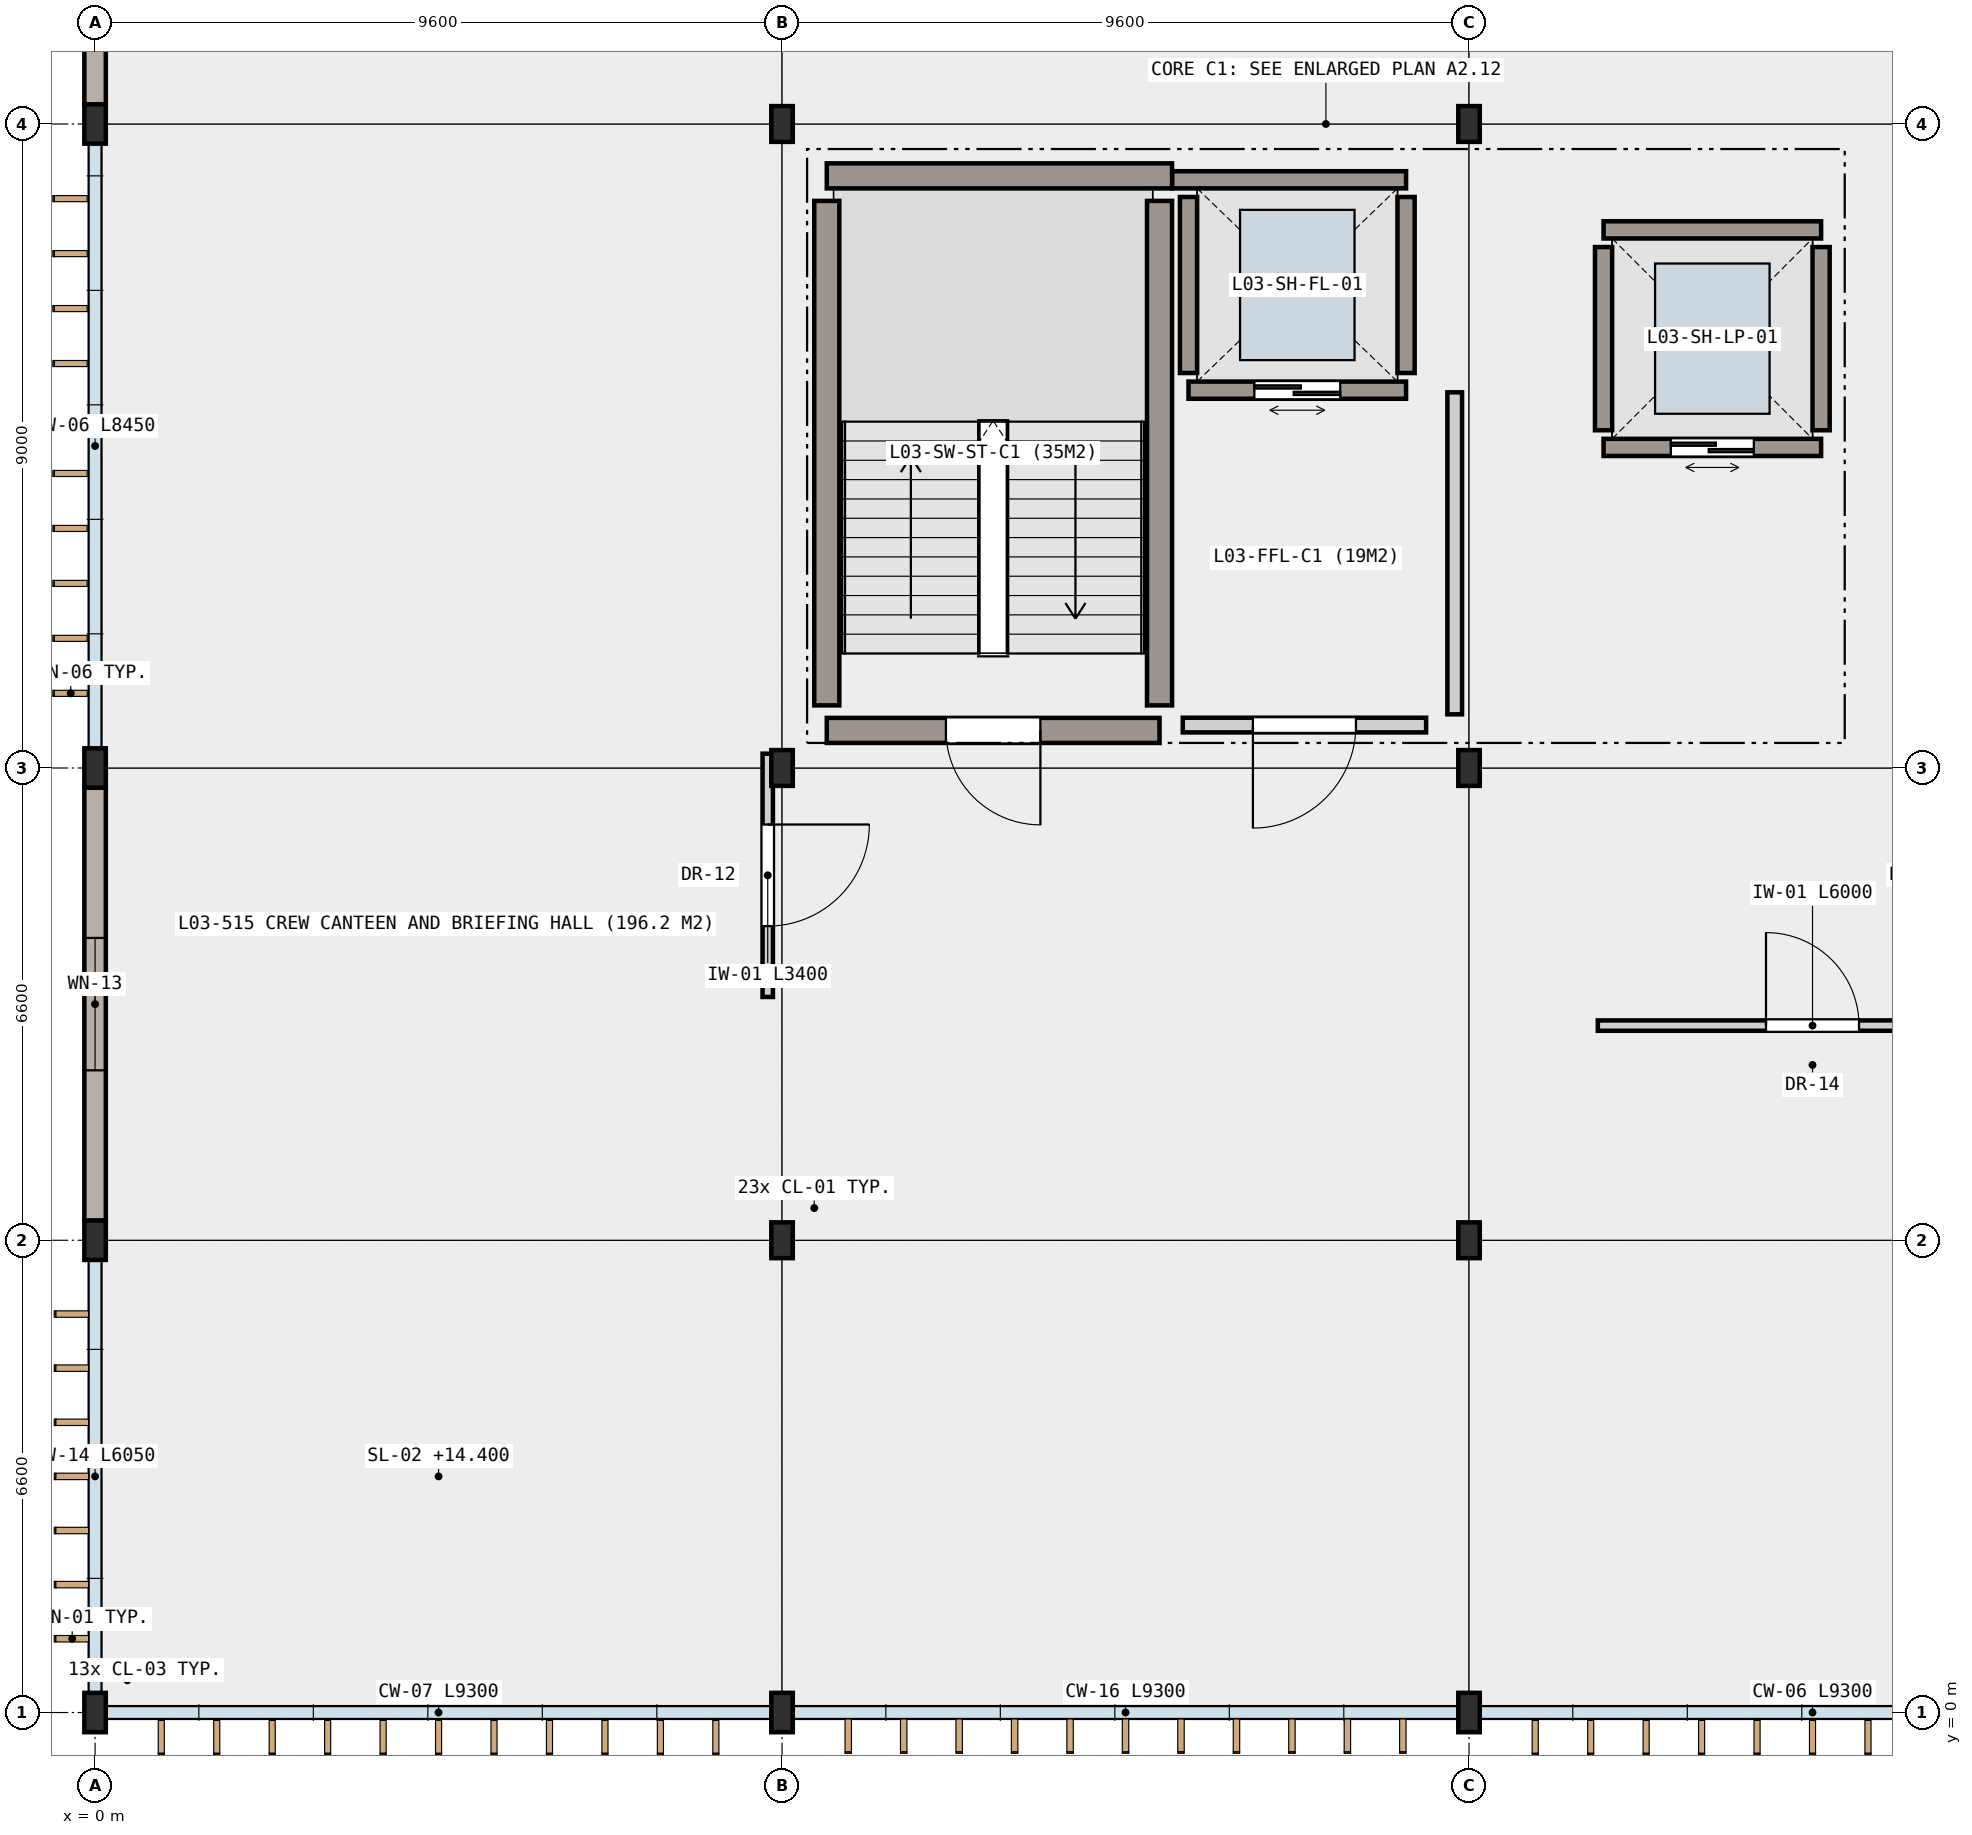
"""IFC4 building model, lengths in metres.
Left out: names, types, materials, properties, quantities, classifications, styles, units other than length and angle.
Written with IfcOpenShell. Run it as: python <this file> out.ifc"""

import sys

from ifc_helpers import new_model, si_unit, direction, frame, frame_2d, origin, origin_2d, place, context, subcontext, project, spatial, rectangle, i_section, extrude, element, fill, save


model = new_model("IFC4")
c1 = context("Model", 3, precision=1e-05, world=origin(), true_north=direction((0.0, 1.0)))
c2 = subcontext(c1, "Body", "Model", "MODEL_VIEW")
j1 = project(units=[si_unit("LENGTHUNIT", "METRE"), si_unit("PLANEANGLEUNIT", "RADIAN")], contexts=[c1])
p1 = place(None, origin())
s1 = spatial("IfcSite", under=j1, at=p1, CompositionType="ELEMENT")
p2 = place(p1, origin())
s2 = spatial("IfcBuilding", under=s1, at=p2, CompositionType="ELEMENT")
p3 = place(p2, frame((0.0, 0.0, 14.4)))
s3 = spatial("IfcBuildingStorey", under=s2, at=p3, CompositionType="ELEMENT", Elevation=14.4)
for number, where, z_axis, x_axis in (
    (1, (0.0, 0.0, 0.0), (0.0, 0.0, 1.0), (1.0, 0.0, 0.0)),
    (2, (0.0, 6.6, 0.0), (0.0, 0.0, 1.0), (1.0, 0.0, 0.0)),
    (3, (0.0, 13.2, 0.0), (0.0, 0.0, 1.0), (1.0, 0.0, 0.0)),
    (4, (0.0, 22.2, 0.0), (0.0, 0.0, 1.0), (1.0, 0.0, 0.0)),
    (5, (9.6, 0.0, 0.0), (0.0, 0.0, 1.0), (1.0, 0.0, 0.0)),
):
    element("IfcColumn", number, at=place(p3, frame(where, z_axis=z_axis, x_axis=x_axis)), inside=s3, PredefinedType="COLUMN", context=c2, shape_type="SweptSolid", body=[
        extrude(i_section(OverallWidth=0.3, OverallDepth=0.55, WebThickness=0.015, FlangeThickness=0.029, FilletRadius=0.027, at=origin_2d()), origin(), (0.0, 0.0, 1.0), 4.2),
    ])
for number, where, z_axis, x_axis in (
    (6, (9.6, 6.6, 0.0), (0.0, 0.0, 1.0), (1.0, 0.0, 0.0)),
    (7, (9.6, 13.2, 0.0), (0.0, 0.0, 1.0), (1.0, 0.0, 0.0)),
    (8, (9.6, 22.2, 0.0), (0.0, 0.0, 1.0), (1.0, 0.0, 0.0)),
):
    element("IfcColumn", number, at=place(p3, frame(where, z_axis=z_axis, x_axis=x_axis)), inside=s3, PredefinedType="COLUMN", context=c2, shape_type="SweptSolid", body=[
        extrude(i_section(OverallWidth=0.3, OverallDepth=0.5, WebThickness=0.014, FlangeThickness=0.028, FilletRadius=0.027, at=origin_2d()), origin(), (0.0, 0.0, 1.0), 4.2),
    ])
p4 = place(p3, frame((19.2, 0.0, 0.0), z_axis=(0.0, 0.0, 1.0), x_axis=(1.0, 0.0, 0.0)))
e9 = element("IfcColumn", 9, at=p4, inside=s3, PredefinedType="COLUMN", context=c2, shape_type="SweptSolid", body=[
    extrude(i_section(OverallWidth=0.3, OverallDepth=0.55, WebThickness=0.015, FlangeThickness=0.029, FilletRadius=0.027, at=origin_2d()), origin(), (0.0, 0.0, 1.0), 4.2),
])
for number, where, z_axis, x_axis in (
    (10, (19.2, 6.6, 0.0), (0.0, 0.0, 1.0), (1.0, 0.0, 0.0)),
    (11, (19.2, 13.2, 0.0), (0.0, 0.0, 1.0), (1.0, 0.0, 0.0)),
    (12, (19.2, 22.2, 0.0), (0.0, 0.0, 1.0), (1.0, 0.0, 0.0)),
):
    element("IfcColumn", number, at=place(p3, frame(where, z_axis=z_axis, x_axis=x_axis)), inside=s3, PredefinedType="COLUMN", context=c2, shape_type="SweptSolid", body=[
        extrude(i_section(OverallWidth=0.3, OverallDepth=0.5, WebThickness=0.014, FlangeThickness=0.028, FilletRadius=0.027, at=origin_2d()), origin(), (0.0, 0.0, 1.0), 4.2),
    ])
p5 = place(p3, frame((0.0, 6.875, 0.0), z_axis=(0.0, 0.0, 1.0), x_axis=(0.0, 1.0, 0.0)))
e13 = element("IfcWall", 13, at=p5, inside=s3, PredefinedType="SOLIDWALL", context=c2, shape_type="SweptSolid", body=[
    extrude(rectangle(XDim=6.05, YDim=0.3, at=frame_2d((3.025, 0.0))), origin(), (0.0, 0.0, 1.0), 3.53),
])
p6 = place(p5, frame((2.1, 0.0, 0.85)))
e14 = element("IfcOpeningElement", 14, at=p6, cuts=e13, PredefinedType="OPENING", context=c2, shape_type="SweptSolid", body=[
    extrude(rectangle(XDim=1.85, YDim=1.5, at=frame_2d((0.925, 0.75))), frame((0.0, 0.16, 0.0), z_axis=(0.0, -1.0, 0.0), x_axis=(1.0, 0.0, 0.0)), (0.0, 0.0, 1.0), 0.32),
])
p7 = place(p3, frame((0.0, 22.475, 0.0), z_axis=(0.0, 0.0, 1.0), x_axis=(0.0, 1.0, 0.0)))
e15 = element("IfcWall", 15, at=p7, inside=s3, PredefinedType="SOLIDWALL", context=c2, shape_type="SweptSolid", body=[
    extrude(rectangle(XDim=8.45, YDim=0.3, at=frame_2d((4.225, 0.0))), origin(), (0.0, 0.0, 1.0), 3.53),
])
p8 = place(p7, frame((1.188, 0.0, 0.85)))
e16 = element("IfcOpeningElement", 16, at=p8, cuts=e15, PredefinedType="OPENING", context=c2, shape_type="SweptSolid", body=[
    extrude(rectangle(XDim=1.85, YDim=1.85, at=frame_2d((0.925, 0.925))), frame((0.0, 0.16, 0.0), z_axis=(0.0, -1.0, 0.0), x_axis=(1.0, 0.0, 0.0)), (0.0, 0.0, 1.0), 0.32),
])
p9 = place(p7, frame((5.413, 0.0, 0.85)))
e17 = element("IfcOpeningElement", 17, at=p9, cuts=e15, PredefinedType="OPENING", context=c2, shape_type="SweptSolid", body=[
    extrude(rectangle(XDim=1.85, YDim=2.15, at=frame_2d((0.925, 1.075))), frame((0.0, 0.16, 0.0), z_axis=(0.0, -1.0, 0.0), x_axis=(1.0, 0.0, 0.0)), (0.0, 0.0, 1.0), 0.32),
])
p10 = place(p3, frame((18.32, 18.48, 0.0), z_axis=(0.0, 0.0, 1.0), x_axis=(-1.0, 0.0, 0.0)))
e18 = element("IfcWall", 18, at=p10, inside=s3, PredefinedType="SHEAR", context=c2, shape_type="SweptSolid", body=[
    extrude(rectangle(XDim=3.04, YDim=0.24, at=frame_2d((1.52, 0.0))), origin(), (0.0, 0.0, 1.0), 3.96),
])
p11 = place(p10, frame((0.92, 0.0, 0.0)))
e19 = element("IfcOpeningElement", 19, at=p11, cuts=e18, PredefinedType="OPENING", context=c2, shape_type="SweptSolid", body=[
    extrude(rectangle(XDim=1.2, YDim=2.15, at=frame_2d((0.6, 1.075))), frame((0.0, 0.13, 0.0), z_axis=(0.0, -1.0, 0.0), x_axis=(1.0, 0.0, 0.0)), (0.0, 0.0, 1.0), 0.26),
])
p12 = place(p3, frame((15.05, 21.42, 0.0), z_axis=(0.0, 0.0, 1.0), x_axis=(1.0, 0.0, 0.0)))
e20 = element("IfcWall", 20, at=p12, inside=s3, PredefinedType="SHEAR", context=c2, shape_type="SweptSolid", body=[
    extrude(rectangle(XDim=3.27, YDim=0.24, at=frame_2d((1.635, 0.0))), origin(), (0.0, 0.0, 1.0), 3.96),
])
for number, where, z_axis, x_axis in (
    (21, (15.28, 18.72, 0.0), (0.0, 0.0, 1.0), (0.0, 1.0, 0.0)),
    (22, (18.32, 21.18, 0.0), (0.0, 0.0, 1.0), (0.0, -1.0, 0.0)),
):
    element("IfcWall", number, at=place(p3, frame(where, z_axis=z_axis, x_axis=x_axis)), inside=s3, PredefinedType="SHEAR", context=c2, shape_type="SweptSolid", body=[
        extrude(rectangle(XDim=2.46, YDim=0.24, at=frame_2d((1.23, 0.0))), origin(), (0.0, 0.0, 1.0), 3.96),
    ])
p13 = place(p3, frame((24.12, 17.68, 0.0), z_axis=(0.0, 0.0, 1.0), x_axis=(-1.0, 0.0, 0.0)))
e23 = element("IfcWall", 23, at=p13, inside=s3, PredefinedType="SHEAR", context=c2, shape_type="SweptSolid", body=[
    extrude(rectangle(XDim=3.04, YDim=0.24, at=frame_2d((1.52, 0.0))), origin(), (0.0, 0.0, 1.0), 3.96),
])
p14 = place(p13, frame((0.94, 0.0, 0.0)))
e24 = element("IfcOpeningElement", 24, at=p14, cuts=e23, PredefinedType="OPENING", context=c2, shape_type="SweptSolid", body=[
    extrude(rectangle(XDim=1.16, YDim=2.15, at=frame_2d((0.58, 1.075))), frame((0.0, 0.13, 0.0), z_axis=(0.0, -1.0, 0.0), x_axis=(1.0, 0.0, 0.0)), (0.0, 0.0, 1.0), 0.26),
])
p15 = place(p3, frame((21.08, 20.72, 0.0), z_axis=(0.0, 0.0, 1.0), x_axis=(1.0, 0.0, 0.0)))
e25 = element("IfcWall", 25, at=p15, inside=s3, PredefinedType="SHEAR", context=c2, shape_type="SweptSolid", body=[
    extrude(rectangle(XDim=3.04, YDim=0.24, at=frame_2d((1.52, 0.0))), origin(), (0.0, 0.0, 1.0), 3.96),
])
for number, where, z_axis, x_axis in (
    (26, (21.08, 17.92, 0.0), (0.0, 0.0, 1.0), (0.0, 1.0, 0.0)),
    (27, (24.12, 20.48, 0.0), (0.0, 0.0, 1.0), (0.0, -1.0, 0.0)),
):
    element("IfcWall", number, at=place(p3, frame(where, z_axis=z_axis, x_axis=x_axis)), inside=s3, PredefinedType="SHEAR", context=c2, shape_type="SweptSolid", body=[
        extrude(rectangle(XDim=2.56, YDim=0.24, at=frame_2d((1.28, 0.0))), origin(), (0.0, 0.0, 1.0), 3.96),
    ])
p16 = place(p3, frame((14.875, 13.725, 0.0), z_axis=(0.0, 0.0, 1.0), x_axis=(-1.0, 0.0, 0.0)))
e28 = element("IfcWall", 28, at=p16, inside=s3, PredefinedType="SHEAR", context=c2, shape_type="SweptSolid", body=[
    extrude(rectangle(XDim=4.65, YDim=0.35, at=frame_2d((2.325, 0.0))), origin(), (0.0, 0.0, 1.0), 3.96),
])
p17 = place(p16, frame((1.665, 0.0, 0.0)))
e29 = element("IfcOpeningElement", 29, at=p17, cuts=e28, PredefinedType="OPENING", context=c2, shape_type="SweptSolid", body=[
    extrude(rectangle(XDim=1.32, YDim=2.15, at=frame_2d((0.66, 1.075))), frame((0.0, 0.185, 0.0), z_axis=(0.0, -1.0, 0.0), x_axis=(1.0, 0.0, 0.0)), (0.0, 0.0, 1.0), 0.37),
])
p18 = place(p3, frame((10.225, 21.475, 0.0), z_axis=(0.0, 0.0, 1.0), x_axis=(1.0, 0.0, 0.0)))
e30 = element("IfcWall", 30, at=p18, inside=s3, PredefinedType="SHEAR", context=c2, shape_type="SweptSolid", body=[
    extrude(rectangle(XDim=4.825, YDim=0.35, at=frame_2d((2.413, 0.0))), origin(), (0.0, 0.0, 1.0), 3.96),
])
for number, where, z_axis, x_axis in (
    (31, (10.225, 14.075, 0.0), (0.0, 0.0, 1.0), (0.0, 1.0, 0.0)),
    (32, (14.875, 21.125, 0.0), (0.0, 0.0, 1.0), (0.0, -1.0, 0.0)),
):
    element("IfcWall", number, at=place(p3, frame(where, z_axis=z_axis, x_axis=x_axis)), inside=s3, PredefinedType="SHEAR", context=c2, shape_type="SweptSolid", body=[
        extrude(rectangle(XDim=7.05, YDim=0.35, at=frame_2d((3.525, 0.0))), origin(), (0.0, 0.0, 1.0), 3.96),
    ])
p19 = place(p3, frame((18.6, 13.8, 0.0), z_axis=(0.0, 0.0, 1.0), x_axis=(-1.0, 0.0, 0.0)))
e33 = element("IfcWall", 33, at=p19, inside=s3, PredefinedType="PARTITIONING", context=c2, shape_type="SweptSolid", body=[
    extrude(rectangle(XDim=3.4, YDim=0.205, at=frame_2d((1.7, 0.0))), origin(), (0.0, 0.0, 1.0), 3.96),
])
p20 = place(p19, frame((0.98, 0.0, 0.0)))
e34 = element("IfcOpeningElement", 34, at=p20, cuts=e33, PredefinedType="OPENING", context=c2, shape_type="SweptSolid", body=[
    extrude(rectangle(XDim=1.44, YDim=2.18, at=frame_2d((0.72, 1.09))), frame((0.0, 0.113, 0.0), z_axis=(0.0, -1.0, 0.0), x_axis=(1.0, 0.0, 0.0)), (0.0, 0.0, 1.0), 0.225),
])
p21 = place(p3, frame((19.0, 18.45, 0.0), z_axis=(0.0, 0.0, 1.0), x_axis=(0.0, -1.0, 0.0)))
e35 = element("IfcWall", 35, at=p21, inside=s3, PredefinedType="PARTITIONING", context=c2, shape_type="SweptSolid", body=[
    extrude(rectangle(XDim=4.5, YDim=0.205, at=frame_2d((2.25, 0.0))), origin(), (0.0, 0.0, 1.0), 3.38),
])
p22 = place(p3, frame((21.0, 9.6, 0.0), z_axis=(0.0, 0.0, 1.0), x_axis=(1.0, 0.0, 0.0)))
e36 = element("IfcWall", 36, at=p22, inside=s3, PredefinedType="PARTITIONING", context=c2, shape_type="SweptSolid", body=[
    extrude(rectangle(XDim=6.0, YDim=0.145, at=frame_2d((3.0, 0.0))), origin(), (0.0, 0.0, 1.0), 3.96),
])
p23 = place(p22, frame((2.35, 0.0, 0.0)))
e37 = element("IfcOpeningElement", 37, at=p23, cuts=e36, PredefinedType="OPENING", context=c2, shape_type="SweptSolid", body=[
    extrude(rectangle(XDim=1.3, YDim=2.16, at=frame_2d((0.65, 1.08))), frame((0.0, 0.083, 0.0), z_axis=(0.0, -1.0, 0.0), x_axis=(1.0, 0.0, 0.0)), (0.0, 0.0, 1.0), 0.165),
])
p24 = place(p3, frame((9.4, 13.4, 0.0), z_axis=(0.0, 0.0, 1.0), x_axis=(0.0, -1.0, 0.0)))
e38 = element("IfcWall", 38, at=p24, inside=s3, PredefinedType="PARTITIONING", context=c2, shape_type="SweptSolid", body=[
    extrude(rectangle(XDim=3.4, YDim=0.145, at=frame_2d((1.7, 0.0))), origin(), (0.0, 0.0, 1.0), 3.43),
])
p25 = place(p24, frame((0.99, 0.0, 0.0)))
e39 = element("IfcOpeningElement", 39, at=p25, cuts=e38, PredefinedType="OPENING", context=c2, shape_type="SweptSolid", body=[
    extrude(rectangle(XDim=1.42, YDim=2.18, at=frame_2d((0.71, 1.09))), frame((0.0, 0.083, 0.0), z_axis=(0.0, -1.0, 0.0), x_axis=(1.0, 0.0, 0.0)), (0.0, 0.0, 1.0), 0.165),
])
p26 = place(p6, origin())
e40 = element("IfcWindow", 40, at=p26, inside=s3, PartitioningType="SINGLE_PANEL", PredefinedType="WINDOW", context=c2, shape_type="SweptSolid", body=[
    extrude(rectangle(XDim=1.85, YDim=1.5, at=frame_2d((0.925, 0.75))), frame((0.0, 0.03, 0.0), z_axis=(0.0, -1.0, 0.0), x_axis=(1.0, 0.0, 0.0)), (0.0, 0.0, 1.0), 0.06),
])
fill(e14, e40)
p27 = place(p11, origin())
e41 = element("IfcDoor", 41, at=p27, inside=s3, OperationType="DOUBLE_DOOR_SLIDING", PredefinedType="DOOR", context=c2, shape_type="SweptSolid", body=[
    extrude(rectangle(XDim=1.2, YDim=2.15, at=frame_2d((0.6, 1.075))), frame((0.0, 0.025, 0.0), z_axis=(0.0, -1.0, 0.0), x_axis=(1.0, 0.0, 0.0)), (0.0, 0.0, 1.0), 0.05),
])
fill(e19, e41)
p28 = place(p14, origin())
e42 = element("IfcDoor", 42, at=p28, inside=s3, OperationType="DOUBLE_DOOR_SLIDING", PredefinedType="DOOR", context=c2, shape_type="SweptSolid", body=[
    extrude(rectangle(XDim=1.16, YDim=2.15, at=frame_2d((0.58, 1.075))), frame((0.0, 0.025, 0.0), z_axis=(0.0, -1.0, 0.0), x_axis=(1.0, 0.0, 0.0)), (0.0, 0.0, 1.0), 0.05),
])
fill(e24, e42)
p29 = place(p17, origin())
e43 = element("IfcDoor", 43, at=p29, inside=s3, OperationType="SINGLE_SWING_LEFT", PredefinedType="DOOR", context=c2, shape_type="SweptSolid", body=[
    extrude(rectangle(XDim=1.32, YDim=2.15, at=frame_2d((0.66, 1.075))), frame((0.0, 0.025, 0.0), z_axis=(0.0, -1.0, 0.0), x_axis=(1.0, 0.0, 0.0)), (0.0, 0.0, 1.0), 0.05),
])
fill(e29, e43)
p30 = place(p20, origin())
e44 = element("IfcDoor", 44, at=p30, inside=s3, OperationType="SINGLE_SWING_RIGHT", PredefinedType="DOOR", context=c2, shape_type="SweptSolid", body=[
    extrude(rectangle(XDim=1.44, YDim=2.18, at=frame_2d((0.72, 1.09))), frame((0.0, 0.025, 0.0), z_axis=(0.0, -1.0, 0.0), x_axis=(1.0, 0.0, 0.0)), (0.0, 0.0, 1.0), 0.05),
])
fill(e34, e44)
p31 = place(p23, origin())
e45 = element("IfcDoor", 45, at=p31, inside=s3, OperationType="SINGLE_SWING_LEFT", PredefinedType="DOOR", context=c2, shape_type="SweptSolid", body=[
    extrude(rectangle(XDim=1.3, YDim=2.16, at=frame_2d((0.65, 1.08))), frame((0.0, 0.025, 0.0), z_axis=(0.0, -1.0, 0.0), x_axis=(1.0, 0.0, 0.0)), (0.0, 0.0, 1.0), 0.05),
])
fill(e37, e45)
p32 = place(p25, origin())
e46 = element("IfcDoor", 46, at=p32, inside=s3, OperationType="SINGLE_SWING_LEFT", PredefinedType="DOOR", context=c2, shape_type="SweptSolid", body=[
    extrude(rectangle(XDim=1.42, YDim=2.18, at=frame_2d((0.71, 1.09))), frame((0.0, 0.025, 0.0), z_axis=(0.0, -1.0, 0.0), x_axis=(1.0, 0.0, 0.0)), (0.0, 0.0, 1.0), 0.05),
])
fill(e39, e46)
save(model, sys.argv[1])
